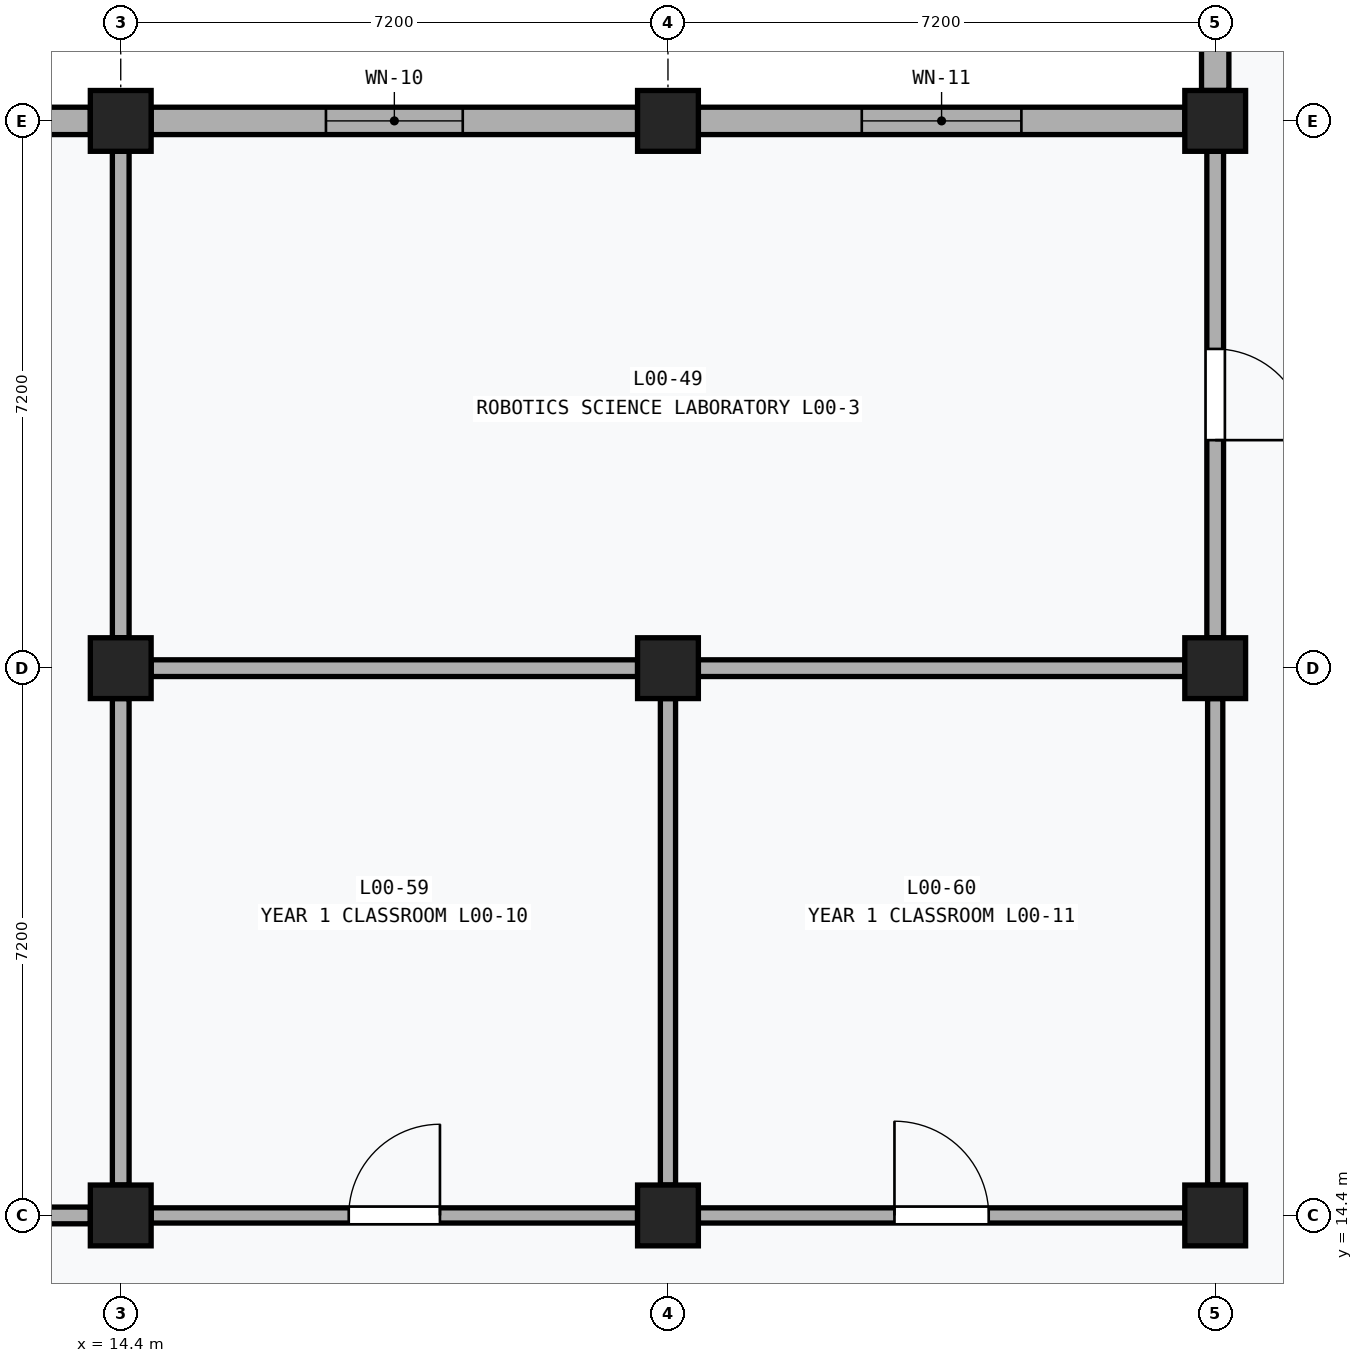
"""IFC4 building model, lengths in metres.
Left out: names, types, materials, properties, quantities, classifications, styles, units other than length and angle.
Written with IfcOpenShell. Run it as: python <this file> out.ifc"""

import sys

from ifc_helpers import new_model, si_unit, direction, frame, frame_2d, origin, origin_2d, place, context, subcontext, project, spatial, rectangle, extrude, element, fill, save


model = new_model("IFC4")
c1 = context("Model", 3, precision=1e-05, world=origin(), true_north=direction((0.0, 1.0)))
c2 = subcontext(c1, "Body", "Model", "MODEL_VIEW")
j1 = project(units=[si_unit("LENGTHUNIT", "METRE"), si_unit("PLANEANGLEUNIT", "RADIAN")], contexts=[c1])
p1 = place(None, origin())
s1 = spatial("IfcSite", under=j1, at=p1, CompositionType="ELEMENT")
p2 = place(p1, origin())
s2 = spatial("IfcBuilding", under=s1, at=p2, CompositionType="ELEMENT")
p3 = place(p2, origin())
s3 = spatial("IfcBuildingStorey", under=s2, at=p3, CompositionType="ELEMENT", Elevation=0.0)
for number, where, z_axis, x_axis in (
    (1, (14.4, 14.4, 0.0), (0.0, 0.0, 1.0), (1.0, 0.0, 0.0)),
    (2, (14.4, 21.6, 0.0), (0.0, 0.0, 1.0), (1.0, 0.0, 0.0)),
    (3, (14.4, 28.8, 0.0), (0.0, 0.0, 1.0), (1.0, 0.0, 0.0)),
    (4, (21.6, 14.4, 0.0), (0.0, 0.0, 1.0), (1.0, 0.0, 0.0)),
    (5, (21.6, 21.6, 0.0), (0.0, 0.0, 1.0), (1.0, 0.0, 0.0)),
    (6, (21.6, 28.8, 0.0), (0.0, 0.0, 1.0), (1.0, 0.0, 0.0)),
    (7, (28.8, 14.4, 0.0), (0.0, 0.0, 1.0), (1.0, 0.0, 0.0)),
    (8, (28.8, 21.6, 0.0), (0.0, 0.0, 1.0), (1.0, 0.0, 0.0)),
    (9, (28.8, 28.8, 0.0), (0.0, 0.0, 1.0), (1.0, 0.0, 0.0)),
):
    element("IfcColumn", number, at=place(p3, frame(where, z_axis=z_axis, x_axis=x_axis)), inside=s3, PredefinedType="COLUMN", context=c2, shape_type="SweptSolid", body=[
        extrude(rectangle(XDim=0.8, YDim=0.8, at=origin_2d()), origin(), (0.0, 0.0, 1.0), 4.8),
    ])
p4 = place(p3, frame((7.45, 28.8, 0.0), z_axis=(0.0, 0.0, 1.0), x_axis=(1.0, 0.0, 0.0)))
e10 = element("IfcWall", 10, at=p4, inside=s3, PredefinedType="SOLIDWALL", context=c2, shape_type="SweptSolid", body=[
    extrude(rectangle(XDim=6.55, YDim=0.36, at=frame_2d((3.275, 0.0))), origin(), (0.0, 0.0, 1.0), 3.89),
])
p5 = place(p4, frame((2.275, 0.0, 0.0)))
e11 = element("IfcOpeningElement", 11, at=p5, cuts=e10, PredefinedType="OPENING", context=c2, shape_type="SweptSolid", body=[
    extrude(rectangle(XDim=2.0, YDim=2.4, at=frame_2d((1.0, 1.2))), frame((0.0, 0.192, 0.0), z_axis=(0.0, -1.0, 0.0), x_axis=(1.0, 0.0, 0.0)), (0.0, 0.0, 1.0), 0.384),
])
p6 = place(p3, frame((14.8, 28.8, 0.0), z_axis=(0.0, 0.0, 1.0), x_axis=(1.0, 0.0, 0.0)))
e12 = element("IfcWall", 12, at=p6, inside=s3, PredefinedType="SOLIDWALL", context=c2, shape_type="SweptSolid", body=[
    extrude(rectangle(XDim=6.4, YDim=0.36, at=frame_2d((3.2, 0.0))), origin(), (0.0, 0.0, 1.0), 3.89),
])
p7 = place(p6, frame((2.3, 0.0, 0.85)))
e13 = element("IfcOpeningElement", 13, at=p7, cuts=e12, PredefinedType="OPENING", context=c2, shape_type="SweptSolid", body=[
    extrude(rectangle(XDim=1.8, YDim=2.0, at=frame_2d((0.9, 1.0))), frame((0.0, 0.192, 0.0), z_axis=(0.0, -1.0, 0.0), x_axis=(1.0, 0.0, 0.0)), (0.0, 0.0, 1.0), 0.384),
])
p8 = place(p3, frame((22.0, 28.8, 0.0), z_axis=(0.0, 0.0, 1.0), x_axis=(1.0, 0.0, 0.0)))
e14 = element("IfcWall", 14, at=p8, inside=s3, PredefinedType="SOLIDWALL", context=c2, shape_type="SweptSolid", body=[
    extrude(rectangle(XDim=6.4, YDim=0.36, at=frame_2d((3.2, 0.0))), origin(), (0.0, 0.0, 1.0), 3.89),
])
p9 = place(p8, frame((2.15, 0.0, 0.85)))
e15 = element("IfcOpeningElement", 15, at=p9, cuts=e14, PredefinedType="OPENING", context=c2, shape_type="SweptSolid", body=[
    extrude(rectangle(XDim=2.1, YDim=2.0, at=frame_2d((1.05, 1.0))), frame((0.0, 0.192, 0.0), z_axis=(0.0, -1.0, 0.0), x_axis=(1.0, 0.0, 0.0)), (0.0, 0.0, 1.0), 0.384),
])
p10 = place(p3, frame((28.8, 29.2, 0.0), z_axis=(0.0, 0.0, 1.0), x_axis=(0.0, 1.0, 0.0)))
e16 = element("IfcWall", 16, at=p10, inside=s3, PredefinedType="SOLIDWALL", context=c2, shape_type="SweptSolid", body=[
    extrude(rectangle(XDim=6.4, YDim=0.36, at=frame_2d((3.2, 0.0))), origin(), (0.0, 0.0, 1.0), 3.89),
])
p11 = place(p10, frame((2.0, 0.0, 0.85)))
e17 = element("IfcOpeningElement", 17, at=p11, cuts=e16, PredefinedType="OPENING", context=c2, shape_type="SweptSolid", body=[
    extrude(rectangle(XDim=2.4, YDim=2.0, at=frame_2d((1.2, 1.0))), frame((0.0, 0.192, 0.0), z_axis=(0.0, -1.0, 0.0), x_axis=(1.0, 0.0, 0.0)), (0.0, 0.0, 1.0), 0.384),
])
p12 = place(p3, frame((7.65, 14.4, 0.0), z_axis=(0.0, 0.0, 1.0), x_axis=(1.0, 0.0, 0.0)))
e18 = element("IfcWall", 18, at=p12, inside=s3, PredefinedType="PARTITIONING", context=c2, shape_type="SweptSolid", body=[
    extrude(rectangle(XDim=6.35, YDim=0.22, at=frame_2d((3.175, 0.0))), origin(), (0.0, 0.0, 1.0), 3.62),
])
p13 = place(p12, frame((2.595, 0.0, 0.0)))
e19 = element("IfcOpeningElement", 19, at=p13, cuts=e18, PredefinedType="OPENING", context=c2, shape_type="SweptSolid", body=[
    extrude(rectangle(XDim=1.16, YDim=2.22, at=frame_2d((0.58, 1.11))), frame((0.0, 0.122, 0.0), z_axis=(0.0, -1.0, 0.0), x_axis=(1.0, 0.0, 0.0)), (0.0, 0.0, 1.0), 0.244),
])
for number, where, z_axis, x_axis in (
    (20, (14.4, 14.8, 0.0), (0.0, 0.0, 1.0), (0.0, 1.0, 0.0)),
    (21, (14.4, 22.0, 0.0), (0.0, 0.0, 1.0), (0.0, 1.0, 0.0)),
    (22, (14.8, 21.6, 0.0), (0.0, 0.0, 1.0), (1.0, 0.0, 0.0)),
    (23, (22.0, 21.6, 0.0), (0.0, 0.0, 1.0), (1.0, 0.0, 0.0)),
):
    element("IfcWall", number, at=place(p3, frame(where, z_axis=z_axis, x_axis=x_axis)), inside=s3, PredefinedType="PARTITIONING", context=c2, shape_type="SweptSolid", body=[
        extrude(rectangle(XDim=6.4, YDim=0.22, at=frame_2d((3.2, 0.0))), origin(), (0.0, 0.0, 1.0), 3.62),
    ])
p14 = place(p3, frame((28.8, 22.0, 0.0), z_axis=(0.0, 0.0, 1.0), x_axis=(0.0, 1.0, 0.0)))
e24 = element("IfcWall", 24, at=p14, inside=s3, PredefinedType="PARTITIONING", context=c2, shape_type="SweptSolid", body=[
    extrude(rectangle(XDim=6.4, YDim=0.22, at=frame_2d((3.2, 0.0))), origin(), (0.0, 0.0, 1.0), 3.62),
])
p15 = place(p14, frame((2.6, 0.0, 0.0)))
e25 = element("IfcOpeningElement", 25, at=p15, cuts=e24, PredefinedType="OPENING", context=c2, shape_type="SweptSolid", body=[
    extrude(rectangle(XDim=1.2, YDim=2.24, at=frame_2d((0.6, 1.12))), frame((0.0, 0.122, 0.0), z_axis=(0.0, -1.0, 0.0), x_axis=(1.0, 0.0, 0.0)), (0.0, 0.0, 1.0), 0.244),
])
p16 = place(p3, frame((14.8, 14.4, 0.0), z_axis=(0.0, 0.0, 1.0), x_axis=(1.0, 0.0, 0.0)))
e26 = element("IfcWall", 26, at=p16, inside=s3, PredefinedType="PARTITIONING", context=c2, shape_type="SweptSolid", body=[
    extrude(rectangle(XDim=6.4, YDim=0.2, at=frame_2d((3.2, 0.0))), origin(), (0.0, 0.0, 1.0), 3.62),
])
p17 = place(p16, frame((2.6, 0.0, 0.0)))
e27 = element("IfcOpeningElement", 27, at=p17, cuts=e26, PredefinedType="OPENING", context=c2, shape_type="SweptSolid", body=[
    extrude(rectangle(XDim=1.2, YDim=2.24, at=frame_2d((0.6, 1.12))), frame((0.0, 0.112, 0.0), z_axis=(0.0, -1.0, 0.0), x_axis=(1.0, 0.0, 0.0)), (0.0, 0.0, 1.0), 0.224),
])
p18 = place(p3, frame((21.6, 14.8, 0.0), z_axis=(0.0, 0.0, 1.0), x_axis=(0.0, 1.0, 0.0)))
e28 = element("IfcWall", 28, at=p18, inside=s3, PredefinedType="PARTITIONING", context=c2, shape_type="SweptSolid", body=[
    extrude(rectangle(XDim=6.4, YDim=0.2, at=frame_2d((3.2, 0.0))), origin(), (0.0, 0.0, 1.0), 3.62),
])
p19 = place(p3, frame((22.0, 14.4, 0.0), z_axis=(0.0, 0.0, 1.0), x_axis=(1.0, 0.0, 0.0)))
e29 = element("IfcWall", 29, at=p19, inside=s3, PredefinedType="PARTITIONING", context=c2, shape_type="SweptSolid", body=[
    extrude(rectangle(XDim=6.4, YDim=0.2, at=frame_2d((3.2, 0.0))), origin(), (0.0, 0.0, 1.0), 3.62),
])
p20 = place(p19, frame((2.58, 0.0, 0.0)))
e30 = element("IfcOpeningElement", 30, at=p20, cuts=e29, PredefinedType="OPENING", context=c2, shape_type="SweptSolid", body=[
    extrude(rectangle(XDim=1.24, YDim=2.26, at=frame_2d((0.62, 1.13))), frame((0.0, 0.112, 0.0), z_axis=(0.0, -1.0, 0.0), x_axis=(1.0, 0.0, 0.0)), (0.0, 0.0, 1.0), 0.224),
])
p21 = place(p3, frame((28.8, 14.8, 0.0), z_axis=(0.0, 0.0, 1.0), x_axis=(0.0, 1.0, 0.0)))
e31 = element("IfcWall", 31, at=p21, inside=s3, PredefinedType="PARTITIONING", context=c2, shape_type="SweptSolid", body=[
    extrude(rectangle(XDim=6.4, YDim=0.2, at=frame_2d((3.2, 0.0))), origin(), (0.0, 0.0, 1.0), 3.62),
])
p22 = place(p7, origin())
e32 = element("IfcWindow", 32, at=p22, inside=s3, PartitioningType="SINGLE_PANEL", PredefinedType="WINDOW", context=c2, shape_type="SweptSolid", body=[
    extrude(rectangle(XDim=1.8, YDim=2.0, at=frame_2d((0.9, 1.0))), frame((0.0, 0.03, 0.0), z_axis=(0.0, -1.0, 0.0), x_axis=(1.0, 0.0, 0.0)), (0.0, 0.0, 1.0), 0.06),
])
fill(e13, e32)
p23 = place(p9, origin())
e33 = element("IfcWindow", 33, at=p23, inside=s3, PartitioningType="SINGLE_PANEL", PredefinedType="WINDOW", context=c2, shape_type="SweptSolid", body=[
    extrude(rectangle(XDim=2.1, YDim=2.0, at=frame_2d((1.05, 1.0))), frame((0.0, 0.03, 0.0), z_axis=(0.0, -1.0, 0.0), x_axis=(1.0, 0.0, 0.0)), (0.0, 0.0, 1.0), 0.06),
])
fill(e15, e33)
p24 = place(p15, frame((1.2, 0.0, 0.0), z_axis=(0.0, 0.0, 1.0), x_axis=(-1.0, 0.0, 0.0)))
e34 = element("IfcDoor", 34, at=p24, inside=s3, OperationType="SINGLE_SWING_RIGHT", PredefinedType="DOOR", context=c2, shape_type="SweptSolid", body=[
    extrude(rectangle(XDim=1.2, YDim=2.24, at=frame_2d((0.6, 1.12))), frame((0.0, 0.025, 0.0), z_axis=(0.0, -1.0, 0.0), x_axis=(1.0, 0.0, 0.0)), (0.0, 0.0, 1.0), 0.05),
])
fill(e25, e34)
p25 = place(p17, origin())
e35 = element("IfcDoor", 35, at=p25, inside=s3, OperationType="SINGLE_SWING_RIGHT", PredefinedType="DOOR", context=c2, shape_type="SweptSolid", body=[
    extrude(rectangle(XDim=1.2, YDim=2.24, at=frame_2d((0.6, 1.12))), frame((0.0, 0.025, 0.0), z_axis=(0.0, -1.0, 0.0), x_axis=(1.0, 0.0, 0.0)), (0.0, 0.0, 1.0), 0.05),
])
fill(e27, e35)
p26 = place(p20, origin())
e36 = element("IfcDoor", 36, at=p26, inside=s3, OperationType="SINGLE_SWING_LEFT", PredefinedType="DOOR", context=c2, shape_type="SweptSolid", body=[
    extrude(rectangle(XDim=1.24, YDim=2.26, at=frame_2d((0.62, 1.13))), frame((0.0, 0.025, 0.0), z_axis=(0.0, -1.0, 0.0), x_axis=(1.0, 0.0, 0.0)), (0.0, 0.0, 1.0), 0.05),
])
fill(e30, e36)
save(model, sys.argv[1])
